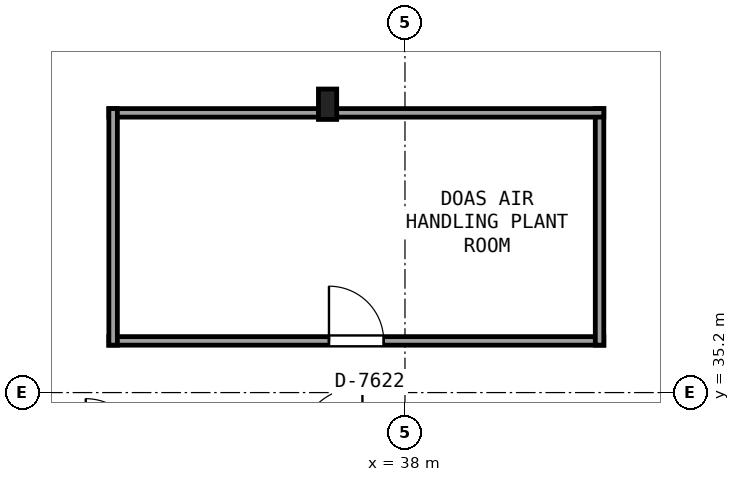
"""IFC4 building model, lengths in metres.
Left out: names, types, materials, properties, quantities, classifications, styles, units other than length and angle.
Written with IfcOpenShell. Run it as: python <this file> out.ifc"""

import sys

from ifc_helpers import new_model, si_unit, direction, frame, frame_2d, origin, origin_2d, place, context, subcontext, project, spatial, rectangle, i_section, extrude, element, fill, save


model = new_model("IFC4")
c1 = context("Model", 3, precision=1e-05, world=origin(), true_north=direction((0.0, 1.0)))
c2 = subcontext(c1, "Body", "Model", "MODEL_VIEW")
j1 = project(units=[si_unit("LENGTHUNIT", "METRE"), si_unit("PLANEANGLEUNIT", "RADIAN")], contexts=[c1])
p1 = place(None, origin())
s1 = spatial("IfcSite", under=j1, at=p1, CompositionType="ELEMENT")
p2 = place(p1, origin())
s2 = spatial("IfcBuilding", under=s1, at=p2, CompositionType="ELEMENT")
p3 = place(p2, frame((0.0, 0.0, 283.5)))
s3 = spatial("IfcBuildingStorey", under=s2, at=p3, CompositionType="ELEMENT", Elevation=283.5)
p4 = place(p3, frame((36.727, 39.942, 0.0), z_axis=(0.0, 0.0, 1.0), x_axis=(1.0, 0.0, 0.0)))
e1 = element("IfcColumn", 1, at=p4, inside=s3, PredefinedType="COLUMN", context=c2, shape_type="SweptSolid", body=[
    extrude(i_section(OverallWidth=0.3, OverallDepth=0.5, WebThickness=0.015, FlangeThickness=0.028, at=origin_2d()), origin(), (0.0, 0.0, 1.0), 2.84),
])
p5 = place(p3, frame((33.13, 36.05, 0.0), z_axis=(0.0, 0.0, 1.0), x_axis=(1.0, 0.0, 0.0)))
e2 = element("IfcWall", 2, at=p5, inside=s3, PredefinedType="PARTITIONING", context=c2, shape_type="SweptSolid", body=[
    extrude(rectangle(XDim=8.14, YDim=0.14, at=frame_2d((4.07, 0.0))), origin(), (0.0, 0.0, 1.0), 2.285),
])
p6 = place(p5, frame((3.62, 0.0, 0.0)))
e3 = element("IfcOpeningElement", 3, at=p6, cuts=e2, PredefinedType="OPENING", context=c2, shape_type="SweptSolid", body=[
    extrude(rectangle(XDim=0.9, YDim=2.0, at=frame_2d((0.45, 1.0))), frame((0.0, 0.08, 0.0), z_axis=(0.0, -1.0, 0.0), x_axis=(1.0, 0.0, 0.0)), (0.0, 0.0, 1.0), 0.16),
])
p7 = place(p3, frame((41.2, 35.98, 0.0), z_axis=(0.0, 0.0, 1.0), x_axis=(0.0, 1.0, 0.0)))
e4 = element("IfcWall", 4, at=p7, inside=s3, PredefinedType="PARTITIONING", context=c2, shape_type="SweptSolid", body=[
    extrude(rectangle(XDim=3.89, YDim=0.14, at=frame_2d((1.945, 0.0))), origin(), (0.0, 0.0, 1.0), 2.365),
])
p8 = place(p3, frame((41.27, 39.8, 0.0), z_axis=(0.0, 0.0, 1.0), x_axis=(-1.0, 0.0, 0.0)))
e5 = element("IfcWall", 5, at=p8, inside=s3, PredefinedType="PARTITIONING", context=c2, shape_type="SweptSolid", body=[
    extrude(rectangle(XDim=8.14, YDim=0.14, at=frame_2d((4.07, 0.0))), origin(), (0.0, 0.0, 1.0), 2.285),
])
p9 = place(p3, frame((33.2, 39.87, 0.0), z_axis=(0.0, 0.0, 1.0), x_axis=(0.0, -1.0, 0.0)))
e6 = element("IfcWall", 6, at=p9, inside=s3, PredefinedType="PARTITIONING", context=c2, shape_type="SweptSolid", body=[
    extrude(rectangle(XDim=3.89, YDim=0.14, at=frame_2d((1.945, 0.0))), origin(), (0.0, 0.0, 1.0), 2.365),
])
p10 = place(p6, origin())
e7 = element("IfcDoor", 7, at=p10, inside=s3, OperationType="SINGLE_SWING_LEFT", PredefinedType="DOOR", context=c2, shape_type="SweptSolid", body=[
    extrude(rectangle(XDim=0.9, YDim=2.0, at=frame_2d((0.45, 1.0))), frame((0.0, 0.025, 0.0), z_axis=(0.0, -1.0, 0.0), x_axis=(1.0, 0.0, 0.0)), (0.0, 0.0, 1.0), 0.05),
])
fill(e3, e7)
save(model, sys.argv[1])
